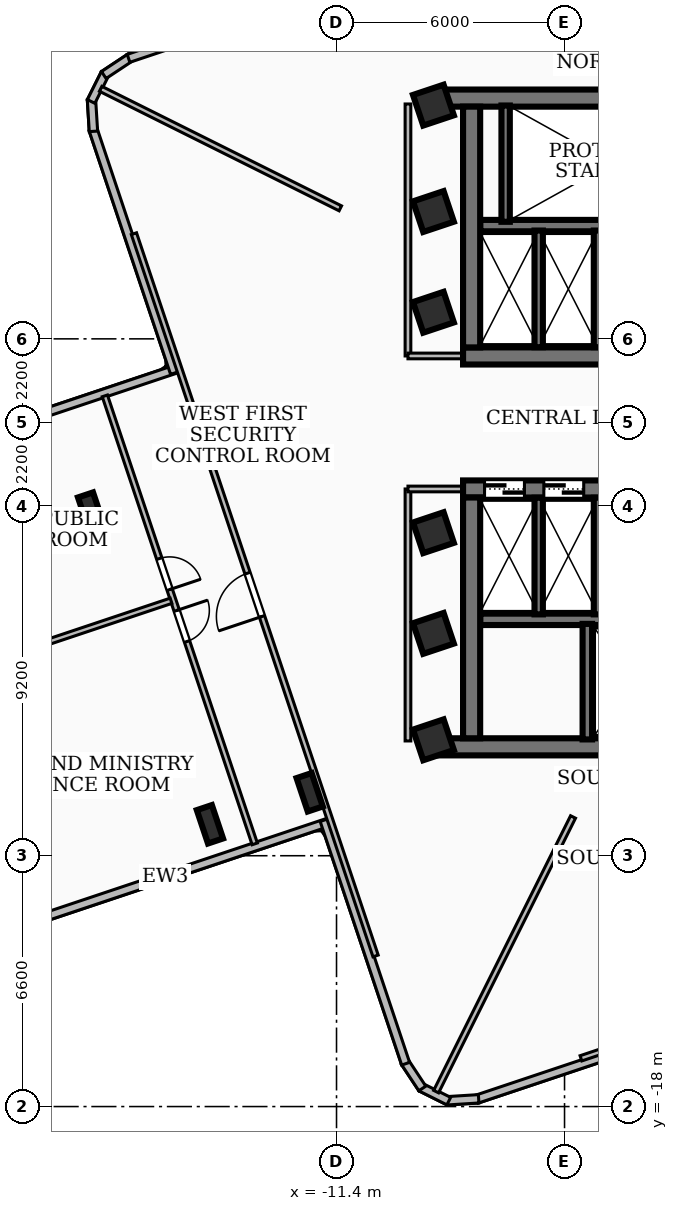
"""IFC4 building model, lengths in metres.
Left out: names, types, materials, properties, quantities, classifications, styles, units other than length and angle.
Written with IfcOpenShell. Run it as: python <this file> out.ifc"""

import sys

from ifc_helpers import new_model, si_unit, direction, frame, frame_2d, origin, origin_2d, place, context, subcontext, project, spatial, rectangle, i_section, extrude, element, fill, save


model = new_model("IFC4")
c1 = context("Model", 3, precision=1e-05, world=origin(), true_north=direction((0.0, 1.0)))
c2 = subcontext(c1, "Body", "Model", "MODEL_VIEW")
j1 = project(units=[si_unit("LENGTHUNIT", "METRE"), si_unit("PLANEANGLEUNIT", "RADIAN")], contexts=[c1])
p1 = place(None, origin())
s1 = spatial("IfcSite", under=j1, at=p1, CompositionType="ELEMENT")
p2 = place(p1, origin())
s2 = spatial("IfcBuilding", under=s1, at=p2, CompositionType="ELEMENT")
p3 = place(p2, frame((0.0, 0.0, 163.08)))
s3 = spatial("IfcBuildingStorey", under=s2, at=p3, CompositionType="ELEMENT", Elevation=163.08)
p4 = place(p3, frame((-8.78, 8.535, 0.0), z_axis=(0.0, 0.0, 1.0), x_axis=(1.0, 0.0, 0.0)))
e1 = element("IfcWall", 1, at=p4, inside=s3, PredefinedType="SHEAR", context=c2, shape_type="SweptSolid", body=[
    extrude(rectangle(XDim=17.56, YDim=0.45, at=frame_2d((8.78, 0.0))), origin(), (0.0, 0.0, 1.0), 3.34),
])
p5 = place(p3, frame((8.07, 1.75, 0.0), z_axis=(0.0, 0.0, 1.0), x_axis=(-1.0, 0.0, 0.0)))
e2 = element("IfcWall", 2, at=p5, inside=s3, PredefinedType="SHEAR", context=c2, shape_type="SweptSolid", body=[
    extrude(rectangle(XDim=16.14, YDim=0.45, at=frame_2d((8.07, 0.0))), origin(), (0.0, 0.0, 1.0), 3.34),
])
p6 = place(p5, frame((7.45, 0.0, 0.0)))
e3 = element("IfcOpeningElement", 3, at=p6, cuts=e2, PredefinedType="OPENING", context=c2, shape_type="SweptSolid", body=[
    extrude(rectangle(XDim=1.0, YDim=2.1, at=frame_2d((0.5, 1.05))), frame((0.0, 0.235, 0.0), z_axis=(0.0, -1.0, 0.0), x_axis=(1.0, 0.0, 0.0)), (0.0, 0.0, 1.0), 0.47),
])
p7 = place(p5, frame((3.4, 0.0, 0.0)))
e4 = element("IfcOpeningElement", 4, at=p7, cuts=e2, PredefinedType="OPENING", context=c2, shape_type="SweptSolid", body=[
    extrude(rectangle(XDim=0.9, YDim=2.06, at=frame_2d((0.45, 1.03))), frame((0.0, 0.235, 0.0), z_axis=(0.0, -1.0, 0.0), x_axis=(1.0, 0.0, 0.0)), (0.0, 0.0, 1.0), 0.47),
])
p8 = place(p5, frame((1.1, 0.0, 0.0)))
e5 = element("IfcOpeningElement", 5, at=p8, cuts=e2, PredefinedType="OPENING", context=c2, shape_type="SweptSolid", body=[
    extrude(rectangle(XDim=0.9, YDim=2.06, at=frame_2d((0.45, 1.03))), frame((0.0, 0.235, 0.0), z_axis=(0.0, -1.0, 0.0), x_axis=(1.0, 0.0, 0.0)), (0.0, 0.0, 1.0), 0.47),
])
p9 = place(p3, frame((-7.845, 1.975, 0.0), z_axis=(0.0, 0.0, 1.0), x_axis=(0.0, 1.0, 0.0)))
e6 = element("IfcWall", 6, at=p9, inside=s3, PredefinedType="SHEAR", context=c2, shape_type="SweptSolid", body=[
    extrude(rectangle(XDim=6.335, YDim=0.45, at=frame_2d((3.167, 0.0))), origin(), (0.0, 0.0, 1.0), 3.34),
])
p10 = place(p3, frame((7.62, 5.18, 0.0), z_axis=(0.0, 0.0, 1.0), x_axis=(-1.0, 0.0, 0.0)))
e7 = element("IfcWall", 7, at=p10, inside=s3, PredefinedType="SOLIDWALL", context=c2, shape_type="SweptSolid", body=[
    extrude(rectangle(XDim=15.24, YDim=0.3, at=frame_2d((7.62, 0.0))), origin(), (0.0, 0.0, 1.0), 3.34),
])
p11 = place(p10, frame((5.77, 0.0, 0.0)))
e8 = element("IfcOpeningElement", 8, at=p11, cuts=e7, PredefinedType="OPENING", context=c2, shape_type="SweptSolid", body=[
    extrude(rectangle(XDim=1.1, YDim=2.15, at=frame_2d((0.55, 1.075))), frame((0.0, 0.16, 0.0), z_axis=(0.0, -1.0, 0.0), x_axis=(1.0, 0.0, 0.0)), (0.0, 0.0, 1.0), 0.32),
])
p12 = place(p10, frame((2.97, 0.0, 0.0)))
e9 = element("IfcOpeningElement", 9, at=p12, cuts=e7, PredefinedType="OPENING", context=c2, shape_type="SweptSolid", body=[
    extrude(rectangle(XDim=1.1, YDim=2.15, at=frame_2d((0.55, 1.075))), frame((0.0, 0.16, 0.0), z_axis=(0.0, -1.0, 0.0), x_axis=(1.0, 0.0, 0.0)), (0.0, 0.0, 1.0), 0.32),
])
p13 = place(p10, frame((7.97, 0.0, 0.0)))
e10 = element("IfcOpeningElement", 10, at=p13, cuts=e7, PredefinedType="OPENING", context=c2, shape_type="SweptSolid", body=[
    extrude(rectangle(XDim=1.0, YDim=2.1, at=frame_2d((0.5, 1.05))), frame((0.0, 0.16, 0.0), z_axis=(0.0, -1.0, 0.0), x_axis=(1.0, 0.0, 0.0)), (0.0, 0.0, 1.0), 0.32),
])
p14 = place(p3, frame((8.78, -8.535, 0.0), z_axis=(0.0, 0.0, 1.0), x_axis=(-1.0, 0.0, 0.0)))
e11 = element("IfcWall", 11, at=p14, inside=s3, PredefinedType="SHEAR", context=c2, shape_type="SweptSolid", body=[
    extrude(rectangle(XDim=17.56, YDim=0.45, at=frame_2d((8.78, 0.0))), origin(), (0.0, 0.0, 1.0), 3.34),
])
p15 = place(p3, frame((-8.07, -1.75, 0.0), z_axis=(0.0, 0.0, 1.0), x_axis=(1.0, 0.0, 0.0)))
e12 = element("IfcWall", 12, at=p15, inside=s3, PredefinedType="SHEAR", context=c2, shape_type="SweptSolid", body=[
    extrude(rectangle(XDim=16.14, YDim=0.45, at=frame_2d((8.07, 0.0))), origin(), (0.0, 0.0, 1.0), 3.34),
])
p16 = place(p15, frame((7.45, 0.0, 0.0)))
e13 = element("IfcOpeningElement", 13, at=p16, cuts=e12, PredefinedType="OPENING", context=c2, shape_type="SweptSolid", body=[
    extrude(rectangle(XDim=1.0, YDim=2.1, at=frame_2d((0.5, 1.05))), frame((0.0, 0.235, 0.0), z_axis=(0.0, -1.0, 0.0), x_axis=(1.0, 0.0, 0.0)), (0.0, 0.0, 1.0), 0.47),
])
p17 = place(p15, frame((12.65, 0.0, 0.0)))
e14 = element("IfcOpeningElement", 14, at=p17, cuts=e12, PredefinedType="OPENING", context=c2, shape_type="SweptSolid", body=[
    extrude(rectangle(XDim=0.9, YDim=2.06, at=frame_2d((0.45, 1.03))), frame((0.0, 0.235, 0.0), z_axis=(0.0, -1.0, 0.0), x_axis=(1.0, 0.0, 0.0)), (0.0, 0.0, 1.0), 0.47),
])
p18 = place(p15, frame((0.565, 0.0, 0.0)))
e15 = element("IfcOpeningElement", 15, at=p18, cuts=e12, PredefinedType="OPENING", context=c2, shape_type="SweptSolid", body=[
    extrude(rectangle(XDim=1.05, YDim=2.15, at=frame_2d((0.525, 1.075))), frame((0.0, 0.235, 0.0), z_axis=(0.0, -1.0, 0.0), x_axis=(1.0, 0.0, 0.0)), (0.0, 0.0, 1.0), 0.47),
])
p19 = place(p15, frame((2.125, 0.0, 0.0)))
e16 = element("IfcOpeningElement", 16, at=p19, cuts=e12, PredefinedType="OPENING", context=c2, shape_type="SweptSolid", body=[
    extrude(rectangle(XDim=1.05, YDim=2.15, at=frame_2d((0.525, 1.075))), frame((0.0, 0.235, 0.0), z_axis=(0.0, -1.0, 0.0), x_axis=(1.0, 0.0, 0.0)), (0.0, 0.0, 1.0), 0.47),
])
p20 = place(p15, frame((3.685, 0.0, 0.0)))
e17 = element("IfcOpeningElement", 17, at=p20, cuts=e12, PredefinedType="OPENING", context=c2, shape_type="SweptSolid", body=[
    extrude(rectangle(XDim=1.05, YDim=2.15, at=frame_2d((0.525, 1.075))), frame((0.0, 0.235, 0.0), z_axis=(0.0, -1.0, 0.0), x_axis=(1.0, 0.0, 0.0)), (0.0, 0.0, 1.0), 0.47),
])
p21 = place(p3, frame((-7.845, -8.31, 0.0), z_axis=(0.0, 0.0, 1.0), x_axis=(0.0, 1.0, 0.0)))
e18 = element("IfcWall", 18, at=p21, inside=s3, PredefinedType="SHEAR", context=c2, shape_type="SweptSolid", body=[
    extrude(rectangle(XDim=6.335, YDim=0.45, at=frame_2d((3.167, 0.0))), origin(), (0.0, 0.0, 1.0), 3.34),
])
p22 = place(p3, frame((-7.62, -5.18, 0.0), z_axis=(0.0, 0.0, 1.0), x_axis=(1.0, 0.0, 0.0)))
e19 = element("IfcWall", 19, at=p22, inside=s3, PredefinedType="SOLIDWALL", context=c2, shape_type="SweptSolid", body=[
    extrude(rectangle(XDim=15.24, YDim=0.3, at=frame_2d((7.62, 0.0))), origin(), (0.0, 0.0, 1.0), 3.34),
])
p23 = place(p22, frame((5.77, 0.0, 0.0)))
e20 = element("IfcOpeningElement", 20, at=p23, cuts=e19, PredefinedType="OPENING", context=c2, shape_type="SweptSolid", body=[
    extrude(rectangle(XDim=1.1, YDim=2.15, at=frame_2d((0.55, 1.075))), frame((0.0, 0.16, 0.0), z_axis=(0.0, -1.0, 0.0), x_axis=(1.0, 0.0, 0.0)), (0.0, 0.0, 1.0), 0.32),
])
p24 = place(p22, frame((7.97, 0.0, 0.0)))
e21 = element("IfcOpeningElement", 21, at=p24, cuts=e19, PredefinedType="OPENING", context=c2, shape_type="SweptSolid", body=[
    extrude(rectangle(XDim=1.0, YDim=2.1, at=frame_2d((0.5, 1.05))), frame((0.0, 0.16, 0.0), z_axis=(0.0, -1.0, 0.0), x_axis=(1.0, 0.0, 0.0)), (0.0, 0.0, 1.0), 0.32),
])
p25 = place(p3, frame((-6.95, 5.28, 0.0), z_axis=(0.0, 0.0, 1.0), x_axis=(0.0, 1.0, 0.0)))
e22 = element("IfcWall", 22, at=p25, inside=s3, PredefinedType="SOLIDWALL", context=c2, shape_type="SweptSolid", body=[
    extrude(rectangle(XDim=3.06, YDim=0.22, at=frame_2d((1.53, 0.0))), origin(), (0.0, 0.0, 1.0), 3.34),
])
p26 = place(p3, frame((-4.8, -8.34, 0.0), z_axis=(0.0, 0.0, 1.0), x_axis=(0.0, 1.0, 0.0)))
e23 = element("IfcWall", 23, at=p26, inside=s3, PredefinedType="SOLIDWALL", context=c2, shape_type="SweptSolid", body=[
    extrude(rectangle(XDim=3.04, YDim=0.25, at=frame_2d((1.52, 0.0))), origin(), (0.0, 0.0, 1.0), 3.34),
])
for number, where, z_axis, x_axis in (
    (24, (-6.08, 1.98, 0.0), (0.0, 0.0, 1.0), (0.0, 1.0, 0.0)),
    (25, (-4.52, 1.98, 0.0), (0.0, 0.0, 1.0), (0.0, 1.0, 0.0)),
    (26, (-6.08, -5.05, 0.0), (0.0, 0.0, 1.0), (0.0, 1.0, 0.0)),
    (27, (-4.52, -5.05, 0.0), (0.0, 0.0, 1.0), (0.0, 1.0, 0.0)),
):
    element("IfcWall", number, at=place(p3, frame(where, z_axis=z_axis, x_axis=x_axis)), inside=s3, PredefinedType="SOLIDWALL", context=c2, shape_type="SweptSolid", body=[
        extrude(rectangle(XDim=3.07, YDim=0.22, at=frame_2d((1.535, 0.0))), origin(), (0.0, 0.0, 1.0), 3.34),
    ])
for number, where, z_axis, x_axis in (
    (28, (-8.85, -5.55, 0.0), (0.0, 0.0, 1.0), (0.948, 0.317, 0.0)),
    (29, (-8.85, -2.9, 0.0), (0.0, 0.0, 1.0), (0.948, 0.317, 0.0)),
    (30, (-8.85, 2.9, 0.0), (0.0, 0.0, 1.0), (0.948, 0.317, 0.0)),
    (31, (-8.85, 5.55, 0.0), (0.0, 0.0, 1.0), (0.948, 0.317, 0.0)),
    (32, (-8.85, 8.35, 0.0), (0.0, 0.0, 1.0), (0.948, 0.317, 0.0)),
    (33, (-8.85, -8.35, 0.0), (0.0, 0.0, 1.0), (0.948, 0.317, 0.0)),
):
    element("IfcColumn", number, at=place(p3, frame(where, z_axis=z_axis, x_axis=x_axis)), inside=s3, PredefinedType="COLUMN", context=c2, shape_type="SweptSolid", body=[
        extrude(rectangle(XDim=0.85, YDim=0.85, at=origin_2d()), origin(), (0.0, 0.0, 1.0), 3.6),
    ])
for number, where, z_axis, x_axis in (
    (34, (-17.858, -2.346, 0.0), (0.0, 0.0, 1.0), (0.948, 0.317, 0.0)),
    (35, (-12.106, -9.731, 0.0), (0.0, 0.0, 1.0), (0.948, 0.317, 0.0)),
    (36, (-14.731, -10.573, 0.0), (0.0, 0.0, 1.0), (0.948, 0.317, 0.0)),
):
    element("IfcColumn", number, at=place(p3, frame(where, z_axis=z_axis, x_axis=x_axis)), inside=s3, PredefinedType="COLUMN", context=c2, shape_type="SweptSolid", body=[
        extrude(i_section(OverallWidth=0.418, OverallDepth=0.927, WebThickness=0.019, FlangeThickness=0.032, at=origin_2d()), origin(), (0.0, 0.0, 1.0), 3.6),
    ])
p27 = place(p3, frame((-11.615, -10.519, 0.0), z_axis=(0.0, 0.0, 1.0), x_axis=(-0.948329626758, -0.317286808759, 0.0)))
e37 = element("IfcWall", 37, at=p27, inside=s3, PredefinedType="SOLIDWALL", context=c2, shape_type="SweptSolid", body=[
    extrude(rectangle(XDim=9.058, YDim=0.22, at=frame_2d((4.529, 0.0))), origin(), (0.0, 0.0, 1.0), 2.72),
])
p28 = place(p3, frame((-24.197, -1.463, 0.0), z_axis=(0.0, 0.0, 1.0), x_axis=(0.948337736373, 0.31726256913, 0.0)))
e38 = element("IfcWall", 38, at=p28, inside=s3, PredefinedType="SOLIDWALL", context=c2, shape_type="SweptSolid", body=[
    extrude(rectangle(XDim=9.058, YDim=0.22, at=frame_2d((4.529, 0.0))), origin(), (0.0, 0.0, 1.0), 3.34),
])
p29 = place(p28, frame((1.1, 0.0, 0.85)))
e39 = element("IfcOpeningElement", 39, at=p29, cuts=e38, PredefinedType="OPENING", context=c2, shape_type="SweptSolid", body=[
    extrude(rectangle(XDim=2.1, YDim=1.6, at=frame_2d((1.05, 0.8))), frame((0.0, 0.12, 0.0), z_axis=(0.0, -1.0, 0.0), x_axis=(1.0, 0.0, 0.0)), (0.0, 0.0, 1.0), 0.24),
])
p30 = place(p3, frame((-15.662, 1.3, 0.0), z_axis=(0.0, 0.0, 1.0), x_axis=(-0.317224676093, 0.948350412494, 0.0)))
e40 = element("IfcWall", 40, at=p30, inside=s3, PredefinedType="SOLIDWALL", context=c2, shape_type="SweptSolid", body=[
    extrude(rectangle(XDim=6.758, YDim=0.22, at=frame_2d((3.379, 0.0))), origin(), (0.0, 0.0, 1.0), 3.34),
])
p31 = place(p3, frame((-17.796, 7.66, 0.0), z_axis=(0.0, 0.0, 1.0), x_axis=(-0.062305442082, 0.998057128569, 0.0)))
e41 = element("IfcWall", 41, at=p31, inside=s3, PredefinedType="SOLIDWALL", context=c2, shape_type="SweptSolid", body=[
    extrude(rectangle(XDim=0.835, YDim=0.22, at=frame_2d((0.417, 0.0))), origin(), (0.0, 0.0, 1.0), 3.34),
])
p32 = place(p3, frame((-17.857, 8.446, 0.0), z_axis=(0.0, 0.0, 1.0), x_axis=(0.446258139106, 0.894904281631, 0.0)))
e42 = element("IfcWall", 42, at=p32, inside=s3, PredefinedType="SOLIDWALL", context=c2, shape_type="SweptSolid", body=[
    extrude(rectangle(XDim=0.818, YDim=0.22, at=frame_2d((0.409, 0.0))), origin(), (0.0, 0.0, 1.0), 3.34),
])
p33 = place(p3, frame((-17.524, 9.142, 0.0), z_axis=(0.0, 0.0, 1.0), x_axis=(0.833756011094, 0.552133058206, 0.0)))
e43 = element("IfcWall", 43, at=p33, inside=s3, PredefinedType="SOLIDWALL", context=c2, shape_type="SweptSolid", body=[
    extrude(rectangle(XDim=0.835, YDim=0.22, at=frame_2d((0.417, 0.0))), origin(), (0.0, 0.0, 1.0), 3.34),
])
p34 = place(p3, frame((-16.873, 9.581, 0.0), z_axis=(0.0, 0.0, 1.0), x_axis=(0.94829606055, 0.317387116224, 0.0)))
e44 = element("IfcWall", 44, at=p34, inside=s3, PredefinedType="SOLIDWALL", context=c2, shape_type="SweptSolid", body=[
    extrude(rectangle(XDim=6.758, YDim=0.22, at=frame_2d((3.379, 0.0))), origin(), (0.0, 0.0, 1.0), 3.34),
])
p35 = place(p3, frame((-1.3, -15.662, 0.0), z_axis=(0.0, 0.0, 1.0), x_axis=(-0.948350412494, -0.317224676093, 0.0)))
e45 = element("IfcWall", 45, at=p35, inside=s3, PredefinedType="SOLIDWALL", context=c2, shape_type="SweptSolid", body=[
    extrude(rectangle(XDim=6.758, YDim=0.22, at=frame_2d((3.379, 0.0))), origin(), (0.0, 0.0, 1.0), 2.644),
])
p36 = place(p3, frame((-7.66, -17.796, 0.0), z_axis=(0.0, 0.0, 1.0), x_axis=(-0.998057128569, -0.062305442082, 0.0)))
e46 = element("IfcWall", 46, at=p36, inside=s3, PredefinedType="SOLIDWALL", context=c2, shape_type="SweptSolid", body=[
    extrude(rectangle(XDim=0.835, YDim=0.22, at=frame_2d((0.417, 0.0))), origin(), (0.0, 0.0, 1.0), 3.34),
])
p37 = place(p3, frame((-8.446, -17.857, 0.0), z_axis=(0.0, 0.0, 1.0), x_axis=(-0.894904281631, 0.446258139106, 0.0)))
e47 = element("IfcWall", 47, at=p37, inside=s3, PredefinedType="SOLIDWALL", context=c2, shape_type="SweptSolid", body=[
    extrude(rectangle(XDim=0.818, YDim=0.22, at=frame_2d((0.409, 0.0))), origin(), (0.0, 0.0, 1.0), 3.34),
])
p38 = place(p3, frame((-9.142, -17.524, 0.0), z_axis=(0.0, 0.0, 1.0), x_axis=(-0.552133058206, 0.833756011094, 0.0)))
e48 = element("IfcWall", 48, at=p38, inside=s3, PredefinedType="SOLIDWALL", context=c2, shape_type="SweptSolid", body=[
    extrude(rectangle(XDim=0.835, YDim=0.22, at=frame_2d((0.417, 0.0))), origin(), (0.0, 0.0, 1.0), 3.34),
])
p39 = place(p3, frame((-9.581, -16.873, 0.0), z_axis=(0.0, 0.0, 1.0), x_axis=(-0.317387116224, 0.94829606055, 0.0)))
e49 = element("IfcWall", 49, at=p39, inside=s3, PredefinedType="SOLIDWALL", context=c2, shape_type="SweptSolid", body=[
    extrude(rectangle(XDim=6.758, YDim=0.22, at=frame_2d((3.379, 0.0))), origin(), (0.0, 0.0, 1.0), 2.72),
])
p40 = place(p3, frame((-9.52, 1.75, 0.0), z_axis=(0.0, 0.0, 1.0), x_axis=(0.0, 1.0, 0.0)))
e50 = element("IfcWall", 50, at=p40, inside=s3, PredefinedType="PARTITIONING", context=c2, shape_type="SweptSolid", body=[
    extrude(rectangle(XDim=6.63, YDim=0.15, at=frame_2d((3.315, 0.0))), origin(), (0.0, 0.0, 1.0), 3.34),
])
p41 = place(p3, frame((-7.85, 1.75, 0.0), z_axis=(0.0, 0.0, 1.0), x_axis=(-1.0, 0.0, 0.0)))
e51 = element("IfcWall", 51, at=p41, inside=s3, PredefinedType="PARTITIONING", context=c2, shape_type="SweptSolid", body=[
    extrude(rectangle(XDim=1.67, YDim=0.15, at=frame_2d((0.835, 0.0))), origin(), (0.0, 0.0, 1.0), 2.57),
])
p42 = place(p3, frame((-9.52, -8.38, 0.0), z_axis=(0.0, 0.0, 1.0), x_axis=(0.0, 1.0, 0.0)))
e52 = element("IfcWall", 52, at=p42, inside=s3, PredefinedType="PARTITIONING", context=c2, shape_type="SweptSolid", body=[
    extrude(rectangle(XDim=6.63, YDim=0.15, at=frame_2d((3.315, 0.0))), origin(), (0.0, 0.0, 1.0), 2.644),
])
p43 = place(p3, frame((-7.85, -1.75, 0.0), z_axis=(0.0, 0.0, 1.0), x_axis=(-1.0, 0.0, 0.0)))
e53 = element("IfcWall", 53, at=p43, inside=s3, PredefinedType="PARTITIONING", context=c2, shape_type="SweptSolid", body=[
    extrude(rectangle(XDim=1.67, YDim=0.15, at=frame_2d((0.835, 0.0))), origin(), (0.0, 0.0, 1.0), 2.57),
])
p44 = place(p3, frame((-11.3, 5.634, 0.0), z_axis=(0.0, 0.0, 1.0), x_axis=(-0.894904738475, 0.446257222972, 0.0)))
e54 = element("IfcWall", 54, at=p44, inside=s3, PredefinedType="PARTITIONING", context=c2, shape_type="SweptSolid", body=[
    extrude(rectangle(XDim=7.048, YDim=0.145, at=frame_2d((3.524, 0.0))), origin(), (0.0, 0.0, 1.0), 3.34),
])
p45 = place(p3, frame((-5.176, -10.38, 0.0), z_axis=(0.0, 0.0, 1.0), x_axis=(-0.446173290391, -0.894946587759, 0.0)))
e55 = element("IfcWall", 55, at=p45, inside=s3, PredefinedType="PARTITIONING", context=c2, shape_type="SweptSolid", body=[
    extrude(rectangle(XDim=8.075, YDim=0.145, at=frame_2d((4.038, 0.0))), origin(), (0.0, 0.0, 1.0), 2.644),
])
p46 = place(p3, frame((-10.372, -14.037, 0.0), z_axis=(0.0, 0.0, 1.0), x_axis=(-0.317298382655, 0.94832575435, 0.0)))
e56 = element("IfcWall", 56, at=p46, inside=s3, PredefinedType="PARTITIONING", context=c2, shape_type="SweptSolid", body=[
    extrude(rectangle(XDim=20.041, YDim=0.145, at=frame_2d((10.021, 0.0))), origin(), (0.0, 0.0, 1.0), 2.644),
])
p47 = place(p46, frame((9.42, 0.0, 0.0)))
e57 = element("IfcOpeningElement", 57, at=p47, cuts=e56, PredefinedType="OPENING", context=c2, shape_type="SweptSolid", body=[
    extrude(rectangle(XDim=1.2, YDim=2.1, at=frame_2d((0.6, 1.05))), frame((0.0, 0.083, 0.0), z_axis=(0.0, -1.0, 0.0), x_axis=(1.0, 0.0, 0.0)), (0.0, 0.0, 1.0), 0.165),
])
p48 = place(p3, frame((-15.755, -4.692, 0.0), z_axis=(0.0, 0.0, 1.0), x_axis=(-0.948309976651, -0.31734553437, 0.0)))
e58 = element("IfcWall", 58, at=p48, inside=s3, PredefinedType="PARTITIONING", context=c2, shape_type="SweptSolid", body=[
    extrude(rectangle(XDim=8.385, YDim=0.145, at=frame_2d((4.193, 0.0))), origin(), (0.0, 0.0, 1.0), 2.793),
])
p49 = place(p3, frame((-17.496, 0.7, 0.0), z_axis=(0.0, 0.0, 1.0), x_axis=(0.317299961245, -0.948325226172, 0.0)))
e59 = element("IfcWall", 59, at=p49, inside=s3, PredefinedType="PARTITIONING", context=c2, shape_type="SweptSolid", body=[
    extrude(rectangle(XDim=12.43, YDim=0.145, at=frame_2d((6.215, 0.0))), origin(), (0.0, 0.0, 1.0), 2.644),
])
p50 = place(p49, frame((4.515, 0.0, 0.0)))
e60 = element("IfcOpeningElement", 60, at=p50, cuts=e59, PredefinedType="OPENING", context=c2, shape_type="SweptSolid", body=[
    extrude(rectangle(XDim=0.86, YDim=2.04, at=frame_2d((0.43, 1.02))), frame((0.0, 0.083, 0.0), z_axis=(0.0, -1.0, 0.0), x_axis=(1.0, 0.0, 0.0)), (0.0, 0.0, 1.0), 0.165),
])
p51 = place(p49, frame((5.955, 0.0, 0.0)))
e61 = element("IfcOpeningElement", 61, at=p51, cuts=e59, PredefinedType="OPENING", context=c2, shape_type="SweptSolid", body=[
    extrude(rectangle(XDim=0.86, YDim=2.04, at=frame_2d((0.43, 1.02))), frame((0.0, 0.083, 0.0), z_axis=(0.0, -1.0, 0.0), x_axis=(1.0, 0.0, 0.0)), (0.0, 0.0, 1.0), 0.165),
])
p52 = place(p3, frame((14.037, -10.372, 0.0), z_axis=(0.0, 0.0, 1.0), x_axis=(-0.94832575435, -0.317298382655, 0.0)))
e62 = element("IfcWall", 62, at=p52, inside=s3, PredefinedType="PARTITIONING", context=c2, shape_type="SweptSolid", body=[
    extrude(rectangle(XDim=20.041, YDim=0.145, at=frame_2d((10.021, 0.0))), origin(), (0.0, 0.0, 1.0), 2.644),
])
p53 = place(p52, frame((9.42, 0.0, 0.0)))
e63 = element("IfcOpeningElement", 63, at=p53, cuts=e62, PredefinedType="OPENING", context=c2, shape_type="SweptSolid", body=[
    extrude(rectangle(XDim=1.2, YDim=2.1, at=frame_2d((0.6, 1.05))), frame((0.0, 0.083, 0.0), z_axis=(0.0, -1.0, 0.0), x_axis=(1.0, 0.0, 0.0)), (0.0, 0.0, 1.0), 0.165),
])
p54 = place(p18, origin())
e64 = element("IfcDoor", 64, at=p54, inside=s3, OperationType="DOUBLE_DOOR_SLIDING", PredefinedType="DOOR", context=c2, shape_type="SweptSolid", body=[
    extrude(rectangle(XDim=1.05, YDim=2.15, at=frame_2d((0.525, 1.075))), frame((0.0, 0.025, 0.0), z_axis=(0.0, -1.0, 0.0), x_axis=(1.0, 0.0, 0.0)), (0.0, 0.0, 1.0), 0.05),
])
fill(e15, e64)
p55 = place(p19, origin())
e65 = element("IfcDoor", 65, at=p55, inside=s3, OperationType="DOUBLE_DOOR_SLIDING", PredefinedType="DOOR", context=c2, shape_type="SweptSolid", body=[
    extrude(rectangle(XDim=1.05, YDim=2.15, at=frame_2d((0.525, 1.075))), frame((0.0, 0.025, 0.0), z_axis=(0.0, -1.0, 0.0), x_axis=(1.0, 0.0, 0.0)), (0.0, 0.0, 1.0), 0.05),
])
fill(e16, e65)
p56 = place(p47, origin())
e66 = element("IfcDoor", 66, at=p56, inside=s3, OperationType="SINGLE_SWING_LEFT", PredefinedType="DOOR", context=c2, shape_type="SweptSolid", body=[
    extrude(rectangle(XDim=1.2, YDim=2.1, at=frame_2d((0.6, 1.05))), frame((0.0, 0.025, 0.0), z_axis=(0.0, -1.0, 0.0), x_axis=(1.0, 0.0, 0.0)), (0.0, 0.0, 1.0), 0.05),
])
fill(e57, e66)
p57 = place(p50, origin())
e67 = element("IfcDoor", 67, at=p57, inside=s3, OperationType="SINGLE_SWING_RIGHT", PredefinedType="DOOR", context=c2, shape_type="SweptSolid", body=[
    extrude(rectangle(XDim=0.86, YDim=2.04, at=frame_2d((0.43, 1.02))), frame((0.0, 0.025, 0.0), z_axis=(0.0, -1.0, 0.0), x_axis=(1.0, 0.0, 0.0)), (0.0, 0.0, 1.0), 0.05),
])
fill(e60, e67)
p58 = place(p51, origin())
e68 = element("IfcDoor", 68, at=p58, inside=s3, OperationType="SINGLE_SWING_LEFT", PredefinedType="DOOR", context=c2, shape_type="SweptSolid", body=[
    extrude(rectangle(XDim=0.86, YDim=2.04, at=frame_2d((0.43, 1.02))), frame((0.0, 0.025, 0.0), z_axis=(0.0, -1.0, 0.0), x_axis=(1.0, 0.0, 0.0)), (0.0, 0.0, 1.0), 0.05),
])
fill(e61, e68)
save(model, sys.argv[1])
